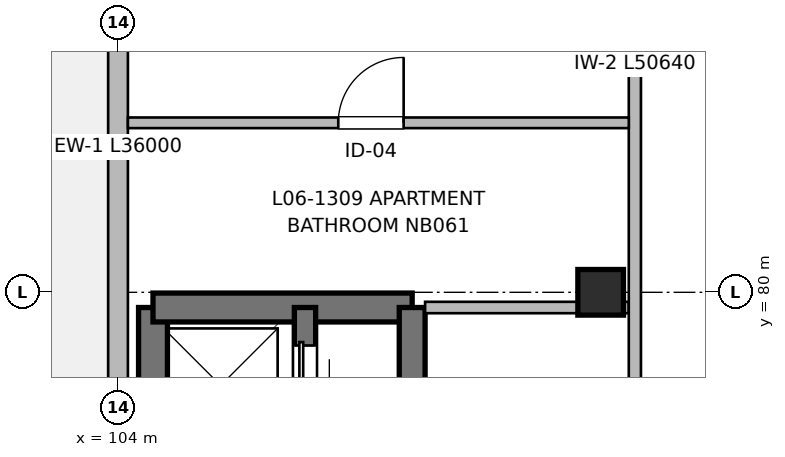
"""IFC4 building model, lengths in metres.
Left out: names, types, materials, properties, quantities, classifications, styles, units other than length and angle.
Written with IfcOpenShell. Run it as: python <this file> out.ifc"""

import sys

from ifc_helpers import new_model, si_unit, direction, frame, frame_2d, origin, origin_2d, place, context, subcontext, project, spatial, rectangle, extrude, element, fill, save


model = new_model("IFC4")
c1 = context("Model", 3, precision=1e-05, world=origin(), true_north=direction((0.0, 1.0)))
c2 = subcontext(c1, "Body", "Model", "MODEL_VIEW")
j1 = project(units=[si_unit("LENGTHUNIT", "METRE"), si_unit("PLANEANGLEUNIT", "RADIAN")], contexts=[c1])
p1 = place(None, origin())
s1 = spatial("IfcSite", under=j1, at=p1, CompositionType="ELEMENT")
p2 = place(p1, origin())
s2 = spatial("IfcBuilding", under=s1, at=p2, CompositionType="ELEMENT")
p3 = place(p2, frame((0.0, 0.0, 20.16)))
s3 = spatial("IfcBuildingStorey", under=s2, at=p3, CompositionType="ELEMENT", Elevation=20.16)
p4 = place(p3, frame((110.35, 80.0, 0.0), z_axis=(0.0, 0.0, 1.0), x_axis=(1.0, 0.0, 0.0)))
e1 = element("IfcColumn", 1, at=p4, inside=s3, PredefinedType="COLUMN", context=c2, shape_type="SweptSolid", body=[
    extrude(rectangle(XDim=0.6, YDim=0.6, at=origin_2d()), origin(), (0.0, 0.0, 1.0), 3.2),
])
p5 = place(p3, frame((104.46, 67.35, 0.0), z_axis=(0.0, 0.0, 1.0), x_axis=(0.0, 1.0, 0.0)))
e2 = element("IfcWall", 2, at=p5, inside=s3, PredefinedType="SHEAR", context=c2, shape_type="SweptSolid", body=[
    extrude(rectangle(XDim=12.45, YDim=0.38, at=frame_2d((6.225, 0.0))), origin(), (0.0, 0.0, 1.0), 3.2),
])
p6 = place(p5, frame((2.2, 0.0, 0.97)))
e3 = element("IfcOpeningElement", 3, at=p6, cuts=e2, PredefinedType="OPENING", context=c2, shape_type="SweptSolid", body=[
    extrude(rectangle(XDim=0.95, YDim=1.25, at=frame_2d((0.475, 0.625))), frame((0.0, 0.2, 0.0), z_axis=(0.0, -1.0, 0.0), x_axis=(1.0, 0.0, 0.0)), (0.0, 0.0, 1.0), 0.4),
])
p7 = place(p3, frame((104.46, 79.8, 0.0), z_axis=(0.0, 0.0, 1.0), x_axis=(1.0, 0.0, 0.0)))
e4 = element("IfcWall", 4, at=p7, inside=s3, PredefinedType="SHEAR", context=c2, shape_type="SweptSolid", body=[
    extrude(rectangle(XDim=3.41, YDim=0.38, at=frame_2d((1.705, 0.0))), origin(), (0.0, 0.0, 1.0), 3.2),
])
p8 = place(p3, frame((107.87, 79.8, 0.0), z_axis=(0.0, 0.0, 1.0), x_axis=(0.0, -1.0, 0.0)))
e5 = element("IfcWall", 5, at=p8, inside=s3, PredefinedType="SHEAR", context=c2, shape_type="SweptSolid", body=[
    extrude(rectangle(XDim=12.45, YDim=0.34, at=frame_2d((6.225, 0.0))), origin(), (0.0, 0.0, 1.0), 3.2),
])
p9 = place(p8, frame((10.85, 0.0, 0.0)))
e6 = element("IfcOpeningElement", 6, at=p9, cuts=e5, PredefinedType="OPENING", context=c2, shape_type="SweptSolid", body=[
    extrude(rectangle(XDim=1.05, YDim=2.15, at=frame_2d((0.525, 1.075))), frame((0.0, 0.18, 0.0), z_axis=(0.0, -1.0, 0.0), x_axis=(1.0, 0.0, 0.0)), (0.0, 0.0, 1.0), 0.36),
])
p10 = place(p3, frame((106.46, 74.55, 0.0), z_axis=(0.0, 0.0, 1.0), x_axis=(0.0, 1.0, 0.0)))
e7 = element("IfcWall", 7, at=p10, inside=s3, PredefinedType="SHEAR", context=c2, shape_type="SweptSolid", body=[
    extrude(rectangle(XDim=5.25, YDim=0.28, at=frame_2d((2.625, 0.0))), origin(), (0.0, 0.0, 1.0), 3.2),
])
p11 = place(p10, frame((1.15, 0.0, 0.0)))
e8 = element("IfcOpeningElement", 8, at=p11, cuts=e7, PredefinedType="OPENING", context=c2, shape_type="SweptSolid", body=[
    extrude(rectangle(XDim=1.0, YDim=2.15, at=frame_2d((0.5, 1.075))), frame((0.0, 0.15, 0.0), z_axis=(0.0, -1.0, 0.0), x_axis=(1.0, 0.0, 0.0)), (0.0, 0.0, 1.0), 0.3),
])
p12 = place(p10, frame((3.85, 0.0, 0.0)))
e9 = element("IfcOpeningElement", 9, at=p12, cuts=e7, PredefinedType="OPENING", context=c2, shape_type="SweptSolid", body=[
    extrude(rectangle(XDim=0.9, YDim=2.15, at=frame_2d((0.45, 1.075))), frame((0.0, 0.15, 0.0), z_axis=(0.0, -1.0, 0.0), x_axis=(1.0, 0.0, 0.0)), (0.0, 0.0, 1.0), 0.3),
])
p13 = place(p3, frame((104.0, 56.0, 0.0), z_axis=(0.0, 0.0, 1.0), x_axis=(0.0, 1.0, 0.0)))
e10 = element("IfcWall", 10, at=p13, inside=s3, PredefinedType="SOLIDWALL", context=c2, shape_type="SweptSolid", body=[
    extrude(rectangle(XDim=36.0, YDim=0.26, at=frame_2d((18.0, 0.0))), origin(), (0.0, 0.0, 1.0), 2.98),
])
p14 = place(p13, frame((3.9, 0.0, 0.0)))
e11 = element("IfcOpeningElement", 11, at=p14, cuts=e10, PredefinedType="OPENING", context=c2, shape_type="SweptSolid", body=[
    extrude(rectangle(XDim=1.2, YDim=2.2, at=frame_2d((0.6, 1.1))), frame((0.0, 0.14, 0.0), z_axis=(0.0, -1.0, 0.0), x_axis=(1.0, 0.0, 0.0)), (0.0, 0.0, 1.0), 0.28),
])
p15 = place(p13, frame((5.8, 0.0, 0.82)))
e12 = element("IfcOpeningElement", 12, at=p15, cuts=e10, PredefinedType="OPENING", context=c2, shape_type="SweptSolid", body=[
    extrude(rectangle(XDim=1.3, YDim=1.4, at=frame_2d((0.65, 0.7))), frame((0.0, 0.14, 0.0), z_axis=(0.0, -1.0, 0.0), x_axis=(1.0, 0.0, 0.0)), (0.0, 0.0, 1.0), 0.28),
])
p16 = place(p13, frame((12.6, 0.0, 0.72)))
e13 = element("IfcOpeningElement", 13, at=p16, cuts=e10, PredefinedType="OPENING", context=c2, shape_type="SweptSolid", body=[
    extrude(rectangle(XDim=1.8, YDim=1.5, at=frame_2d((0.9, 0.75))), frame((0.0, 0.14, 0.0), z_axis=(0.0, -1.0, 0.0), x_axis=(1.0, 0.0, 0.0)), (0.0, 0.0, 1.0), 0.28),
])
p17 = place(p13, frame((19.15, 0.0, 0.72)))
e14 = element("IfcOpeningElement", 14, at=p17, cuts=e10, PredefinedType="OPENING", context=c2, shape_type="SweptSolid", body=[
    extrude(rectangle(XDim=2.0, YDim=1.5, at=frame_2d((1.0, 0.75))), frame((0.0, 0.14, 0.0), z_axis=(0.0, -1.0, 0.0), x_axis=(1.0, 0.0, 0.0)), (0.0, 0.0, 1.0), 0.28),
])
p18 = place(p13, frame((30.675, 0.0, 0.77)))
e15 = element("IfcOpeningElement", 15, at=p18, cuts=e10, PredefinedType="OPENING", context=c2, shape_type="SweptSolid", body=[
    extrude(rectangle(XDim=1.65, YDim=1.45, at=frame_2d((0.825, 0.725))), frame((0.0, 0.14, 0.0), z_axis=(0.0, -1.0, 0.0), x_axis=(1.0, 0.0, 0.0)), (0.0, 0.0, 1.0), 0.28),
])
p19 = place(p3, frame((108.04, 79.8, 0.0), z_axis=(0.0, 0.0, 1.0), x_axis=(1.0, 0.0, 0.0)))
e16 = element("IfcWall", 16, at=p19, inside=s3, PredefinedType="PARTITIONING", context=c2, shape_type="SweptSolid", body=[
    extrude(rectangle(XDim=2.68, YDim=0.15, at=frame_2d((1.34, 0.0))), origin(), (0.0, 0.0, 1.0), 2.935),
])
p20 = place(p3, frame((110.8, 56.16, 0.0), z_axis=(0.0, 0.0, 1.0), x_axis=(0.0, 1.0, 0.0)))
e17 = element("IfcWall", 17, at=p20, inside=s3, PredefinedType="PARTITIONING", context=c2, shape_type="SweptSolid", body=[
    extrude(rectangle(XDim=50.64, YDim=0.16, at=frame_2d((25.32, 0.0))), origin(), (0.0, 0.0, 1.0), 2.935),
])
p21 = place(p20, frame((12.84, 0.0, 0.0)))
e18 = element("IfcOpeningElement", 18, at=p21, cuts=e17, PredefinedType="OPENING", context=c2, shape_type="SweptSolid", body=[
    extrude(rectangle(XDim=1.1, YDim=2.15, at=frame_2d((0.55, 1.075))), frame((0.0, 0.09, 0.0), z_axis=(0.0, -1.0, 0.0), x_axis=(1.0, 0.0, 0.0)), (0.0, 0.0, 1.0), 0.18),
])
p22 = place(p20, frame((19.24, 0.0, 0.0)))
e19 = element("IfcOpeningElement", 19, at=p22, cuts=e17, PredefinedType="OPENING", context=c2, shape_type="SweptSolid", body=[
    extrude(rectangle(XDim=1.6, YDim=2.15, at=frame_2d((0.8, 1.075))), frame((0.0, 0.09, 0.0), z_axis=(0.0, -1.0, 0.0), x_axis=(1.0, 0.0, 0.0)), (0.0, 0.0, 1.0), 0.18),
])
p23 = place(p20, frame((1.8, 0.0, 0.0)))
e20 = element("IfcOpeningElement", 20, at=p23, cuts=e17, PredefinedType="OPENING", context=c2, shape_type="SweptSolid", body=[
    extrude(rectangle(XDim=0.96, YDim=2.15, at=frame_2d((0.48, 1.075))), frame((0.0, 0.09, 0.0), z_axis=(0.0, -1.0, 0.0), x_axis=(1.0, 0.0, 0.0)), (0.0, 0.0, 1.0), 0.18),
])
p24 = place(p20, frame((32.845, 0.0, 0.0)))
e21 = element("IfcOpeningElement", 21, at=p24, cuts=e17, PredefinedType="OPENING", context=c2, shape_type="SweptSolid", body=[
    extrude(rectangle(XDim=0.98, YDim=2.15, at=frame_2d((0.49, 1.075))), frame((0.0, 0.09, 0.0), z_axis=(0.0, -1.0, 0.0), x_axis=(1.0, 0.0, 0.0)), (0.0, 0.0, 1.0), 0.18),
])
p25 = place(p20, frame((40.655, 0.0, 0.0)))
e22 = element("IfcOpeningElement", 22, at=p25, cuts=e17, PredefinedType="OPENING", context=c2, shape_type="SweptSolid", body=[
    extrude(rectangle(XDim=0.98, YDim=2.15, at=frame_2d((0.49, 1.075))), frame((0.0, 0.09, 0.0), z_axis=(0.0, -1.0, 0.0), x_axis=(1.0, 0.0, 0.0)), (0.0, 0.0, 1.0), 0.18),
])
p26 = place(p3, frame((104.13, 82.23, 0.0), z_axis=(0.0, 0.0, 1.0), x_axis=(1.0, 0.0, 0.0)))
e23 = element("IfcWall", 23, at=p26, inside=s3, PredefinedType="PARTITIONING", context=c2, shape_type="SweptSolid", body=[
    extrude(rectangle(XDim=6.59, YDim=0.14, at=frame_2d((3.295, 0.0))), origin(), (0.0, 0.0, 1.0), 2.935),
])
p27 = place(p26, frame((2.768, 0.0, 0.0)))
e24 = element("IfcOpeningElement", 24, at=p27, cuts=e23, PredefinedType="OPENING", context=c2, shape_type="SweptSolid", body=[
    extrude(rectangle(XDim=0.86, YDim=2.1, at=frame_2d((0.43, 1.05))), frame((0.0, 0.08, 0.0), z_axis=(0.0, -1.0, 0.0), x_axis=(1.0, 0.0, 0.0)), (0.0, 0.0, 1.0), 0.16),
])
p28 = place(p12, origin())
e25 = element("IfcDoor", 25, at=p28, inside=s3, OperationType="SLIDING_TO_RIGHT", PredefinedType="DOOR", context=c2, shape_type="SweptSolid", body=[
    extrude(rectangle(XDim=0.9, YDim=2.15, at=frame_2d((0.45, 1.075))), frame((0.0, 0.025, 0.0), z_axis=(0.0, -1.0, 0.0), x_axis=(1.0, 0.0, 0.0)), (0.0, 0.0, 1.0), 0.05),
])
fill(e9, e25)
p29 = place(p27, origin())
e26 = element("IfcDoor", 26, at=p29, inside=s3, OperationType="SINGLE_SWING_RIGHT", PredefinedType="DOOR", context=c2, shape_type="SweptSolid", body=[
    extrude(rectangle(XDim=0.86, YDim=2.1, at=frame_2d((0.43, 1.05))), frame((0.0, 0.025, 0.0), z_axis=(0.0, -1.0, 0.0), x_axis=(1.0, 0.0, 0.0)), (0.0, 0.0, 1.0), 0.05),
])
fill(e24, e26)
save(model, sys.argv[1])
